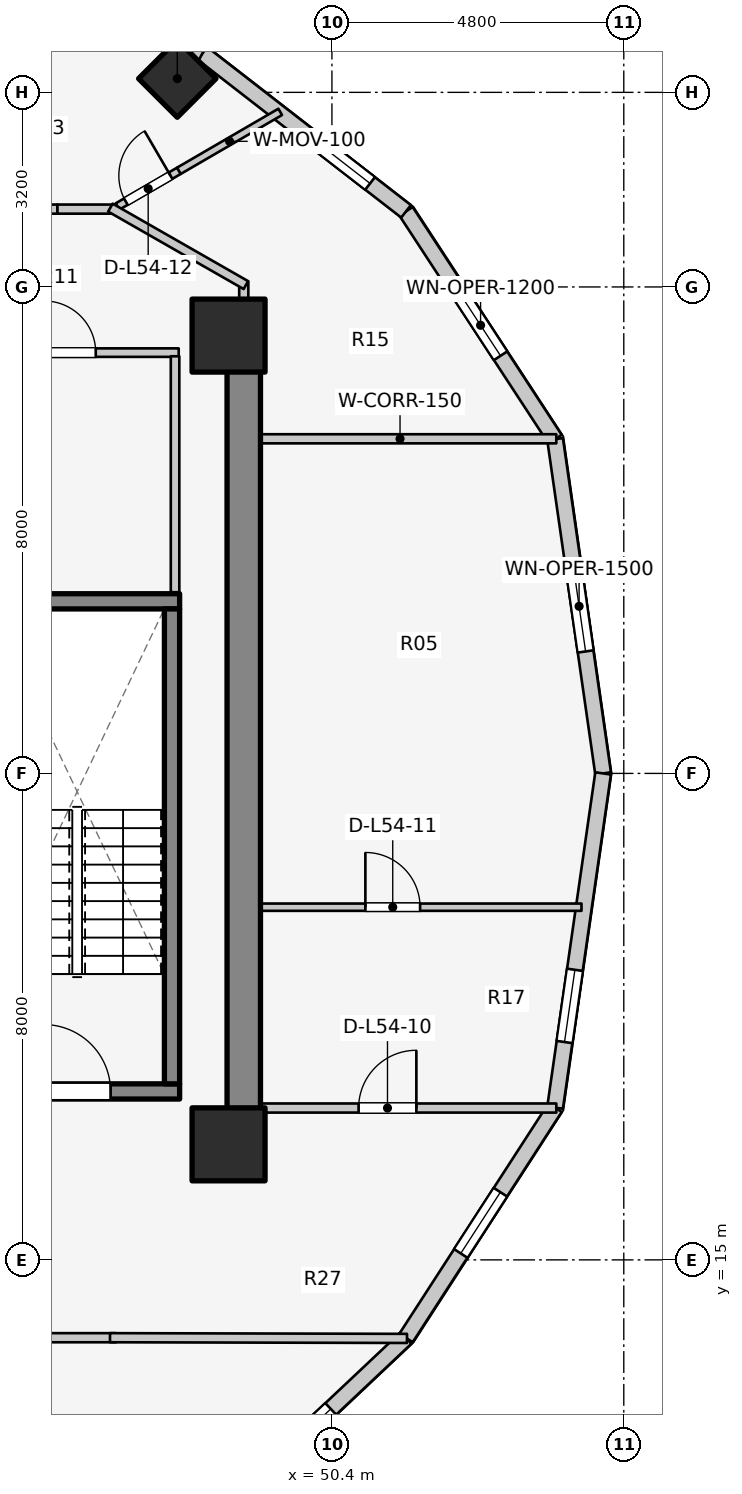
"""IFC4 building model, lengths in metres.
Left out: names, types, materials, properties, quantities, classifications, styles, units other than length and angle.
Written with IfcOpenShell. Run it as: python <this file> out.ifc"""

import sys

from ifc_helpers import new_model, si_unit, direction, frame, frame_2d, origin, origin_2d, place, context, subcontext, project, spatial, rectangle, extrude, element, fill, save


model = new_model("IFC4")
c1 = context("Model", 3, precision=1e-05, world=origin(), true_north=direction((0.0, 1.0)))
c2 = subcontext(c1, "Body", "Model", "MODEL_VIEW")
j1 = project(units=[si_unit("LENGTHUNIT", "METRE"), si_unit("PLANEANGLEUNIT", "RADIAN")], contexts=[c1])
p1 = place(None, origin())
s1 = spatial("IfcSite", under=j1, at=p1, CompositionType="ELEMENT")
p2 = place(p1, origin())
s2 = spatial("IfcBuilding", under=s1, at=p2, CompositionType="ELEMENT")
p3 = place(p2, frame((0.0, 0.0, 177.7)))
s3 = spatial("IfcBuildingStorey", under=s2, at=p3, CompositionType="ELEMENT", Elevation=177.7)
p4 = place(p3, frame((48.95, 17.05, 0.0), z_axis=(0.0, 0.0, 1.0), x_axis=(0.0, 1.0, 0.0)))
e1 = element("IfcWall", 1, at=p4, inside=s3, PredefinedType="SHEAR", context=c2, shape_type="SweptSolid", body=[
    extrude(rectangle(XDim=12.8, YDim=0.55, at=frame_2d((6.4, 0.0))), origin(), (0.0, 0.0, 1.0), 3.1),
])
p5 = place(p3, frame((44.525, 17.77, 0.0), z_axis=(0.0, 0.0, 1.0), x_axis=(1.0, 0.0, 0.0)))
e2 = element("IfcWall", 2, at=p5, inside=s3, PredefinedType="SOLIDWALL", context=c2, shape_type="SweptSolid", body=[
    extrude(rectangle(XDim=3.37, YDim=0.25, at=frame_2d((1.685, 0.0))), origin(), (0.0, 0.0, 1.0), 3.1),
])
p6 = place(p5, frame((1.135, 0.0, 0.0)))
e3 = element("IfcOpeningElement", 3, at=p6, cuts=e2, PredefinedType="OPENING", context=c2, shape_type="SweptSolid", body=[
    extrude(rectangle(XDim=1.1, YDim=2.1, at=frame_2d((0.55, 1.05))), frame((0.0, 0.135, 0.0), z_axis=(0.0, -1.0, 0.0), x_axis=(1.0, 0.0, 0.0)), (0.0, 0.0, 1.0), 0.27),
])
p7 = place(p3, frame((44.525, 25.83, 0.0), z_axis=(0.0, 0.0, 1.0), x_axis=(1.0, 0.0, 0.0)))
e4 = element("IfcWall", 4, at=p7, inside=s3, PredefinedType="SOLIDWALL", context=c2, shape_type="SweptSolid", body=[
    extrude(rectangle(XDim=3.37, YDim=0.25, at=frame_2d((1.685, 0.0))), origin(), (0.0, 0.0, 1.0), 3.1),
])
p8 = place(p3, frame((47.77, 17.895, 0.0), z_axis=(0.0, 0.0, 1.0), x_axis=(0.0, 1.0, 0.0)))
e5 = element("IfcWall", 5, at=p8, inside=s3, PredefinedType="SOLIDWALL", context=c2, shape_type="SweptSolid", body=[
    extrude(rectangle(XDim=7.81, YDim=0.25, at=frame_2d((3.905, 0.0))), origin(), (0.0, 0.0, 1.0), 3.1),
])
for number, where, z_axis, x_axis in (
    (6, (48.7, 16.9, 0.0), (0.0, 0.0, 1.0), (1.0, 0.0, 0.0)),
    (7, (48.7, 30.2, 0.0), (0.0, 0.0, 1.0), (1.0, 0.0, 0.0)),
):
    element("IfcColumn", number, at=place(p3, frame(where, z_axis=z_axis, x_axis=x_axis)), inside=s3, PredefinedType="COLUMN", context=c2, shape_type="SweptSolid", body=[
        extrude(rectangle(XDim=1.2, YDim=1.2, at=origin_2d()), origin(), (0.0, 0.0, 1.0), 3.1),
    ])
p9 = place(p3, frame((47.857, 34.427, 0.0), z_axis=(0.0, 0.0, 1.0), x_axis=(0.707106781187, 0.707106781187, 0.0)))
e8 = element("IfcColumn", 8, at=p9, inside=s3, PredefinedType="COLUMN", context=c2, shape_type="SweptSolid", body=[
    extrude(rectangle(XDim=0.9, YDim=0.9, at=origin_2d()), origin(), (0.0, 0.0, 1.0), 3.1),
])
p10 = place(p3, frame((54.86, 23.0, 0.0), z_axis=(0.0, 0.0, 1.0), x_axis=(-0.142227632286, 0.989833976288, 0.0)))
e9 = element("IfcWall", 9, at=p10, inside=s3, PredefinedType="STANDARD", context=c2, shape_type="SweptSolid", body=[
    extrude(rectangle(XDim=5.553, YDim=0.26, at=frame_2d((2.776, 0.0))), origin(), (0.0, 0.0, 1.0), 2.57),
])
p11 = place(p10, frame((2.027, 0.0, 0.75)))
e10 = element("IfcOpeningElement", 10, at=p11, cuts=e9, PredefinedType="OPENING", context=c2, shape_type="SweptSolid", body=[
    extrude(rectangle(XDim=1.5, YDim=1.6, at=frame_2d((0.75, 0.8))), frame((0.0, 0.14, 0.0), z_axis=(0.0, -1.0, 0.0), x_axis=(1.0, 0.0, 0.0)), (0.0, 0.0, 1.0), 0.28),
])
p12 = place(p3, frame((54.07, 28.497, 0.0), z_axis=(0.0, 0.0, 1.0), x_axis=(-0.547456494366, 0.836834145322, 0.0)))
e11 = element("IfcWall", 11, at=p12, inside=s3, PredefinedType="STANDARD", context=c2, shape_type="SweptSolid", body=[
    extrude(rectangle(XDim=4.477, YDim=0.26, at=frame_2d((2.239, 0.0))), origin(), (0.0, 0.0, 1.0), 1.22),
])
p13 = place(p12, frame((1.639, 0.0, 0.15)))
e12 = element("IfcOpeningElement", 12, at=p13, cuts=e11, PredefinedType="OPENING", context=c2, shape_type="SweptSolid", body=[
    extrude(rectangle(XDim=1.2, YDim=0.9, at=frame_2d((0.6, 0.45))), frame((0.0, 0.14, 0.0), z_axis=(0.0, -1.0, 0.0), x_axis=(1.0, 0.0, 0.0)), (0.0, 0.0, 1.0), 0.28),
])
p14 = place(p3, frame((51.619, 32.243, 0.0), z_axis=(0.0, 0.0, 1.0), x_axis=(-0.790185650662, 0.612867552973, 0.0)))
e13 = element("IfcWall", 13, at=p14, inside=s3, PredefinedType="STANDARD", context=c2, shape_type="SweptSolid", body=[
    extrude(rectangle(XDim=4.239, YDim=0.26, at=frame_2d((2.12, 0.0))), origin(), (0.0, 0.0, 1.0), 1.22),
])
p15 = place(p14, frame((0.749, 0.0, 0.15)))
e14 = element("IfcOpeningElement", 14, at=p15, cuts=e13, PredefinedType="OPENING", context=c2, shape_type="SweptSolid", body=[
    extrude(rectangle(XDim=1.2, YDim=0.9, at=frame_2d((0.6, 0.45))), frame((0.0, 0.14, 0.0), z_axis=(0.0, -1.0, 0.0), x_axis=(1.0, 0.0, 0.0)), (0.0, 0.0, 1.0), 0.28),
])
p16 = place(p3, frame((48.269, 34.842, 0.0), z_axis=(0.0, 0.0, 1.0), x_axis=(-0.885660265226, 0.464333818065, 0.0)))
e15 = element("IfcWall", 15, at=p16, inside=s3, PredefinedType="STANDARD", context=c2, shape_type="SweptSolid", body=[
    extrude(rectangle(XDim=4.354, YDim=0.26, at=frame_2d((2.177, 0.0))), origin(), (0.0, 0.0, 1.0), 1.22),
])
p17 = place(p3, frame((48.269, 10.559, 0.0), z_axis=(0.0, 0.0, 1.0), x_axis=(0.727667301037, 0.68593024354, 0.0)))
e16 = element("IfcWall", 16, at=p17, inside=s3, PredefinedType="STANDARD", context=c2, shape_type="SweptSolid", body=[
    extrude(rectangle(XDim=4.604, YDim=0.26, at=frame_2d((2.302, 0.0))), origin(), (0.0, 0.0, 1.0), 1.22),
])
p18 = place(p17, frame((1.702, 0.0, 0.15)))
e17 = element("IfcOpeningElement", 17, at=p18, cuts=e16, PredefinedType="OPENING", context=c2, shape_type="SweptSolid", body=[
    extrude(rectangle(XDim=1.2, YDim=0.9, at=frame_2d((0.6, 0.45))), frame((0.0, 0.14, 0.0), z_axis=(0.0, -1.0, 0.0), x_axis=(1.0, 0.0, 0.0)), (0.0, 0.0, 1.0), 0.28),
])
p19 = place(p3, frame((51.619, 13.716, 0.0), z_axis=(0.0, 0.0, 1.0), x_axis=(0.543358984534, 0.839500454989, 0.0)))
e18 = element("IfcWall", 18, at=p19, inside=s3, PredefinedType="STANDARD", context=c2, shape_type="SweptSolid", body=[
    extrude(rectangle(XDim=4.511, YDim=0.26, at=frame_2d((2.256, 0.0))), origin(), (0.0, 0.0, 1.0), 1.22),
])
p20 = place(p19, frame((1.656, 0.0, 0.15)))
e19 = element("IfcOpeningElement", 19, at=p20, cuts=e18, PredefinedType="OPENING", context=c2, shape_type="SweptSolid", body=[
    extrude(rectangle(XDim=1.2, YDim=0.9, at=frame_2d((0.6, 0.45))), frame((0.0, 0.14, 0.0), z_axis=(0.0, -1.0, 0.0), x_axis=(1.0, 0.0, 0.0)), (0.0, 0.0, 1.0), 0.28),
])
p21 = place(p3, frame((54.07, 17.503, 0.0), z_axis=(0.0, 0.0, 1.0), x_axis=(0.142227632286, 0.989833976288, 0.0)))
e20 = element("IfcWall", 20, at=p21, inside=s3, PredefinedType="STANDARD", context=c2, shape_type="SweptSolid", body=[
    extrude(rectangle(XDim=5.553, YDim=0.26, at=frame_2d((2.776, 0.0))), origin(), (0.0, 0.0, 1.0), 2.57),
])
p22 = place(p21, frame((1.09, 0.0, 0.75)))
e21 = element("IfcOpeningElement", 21, at=p22, cuts=e20, PredefinedType="OPENING", context=c2, shape_type="SweptSolid", body=[
    extrude(rectangle(XDim=1.2, YDim=1.5, at=frame_2d((0.6, 0.75))), frame((0.0, 0.14, 0.0), z_axis=(0.0, -1.0, 0.0), x_axis=(1.0, 0.0, 0.0)), (0.0, 0.0, 1.0), 0.28),
])
p23 = place(p3, frame((44.98, 29.92, 0.0), z_axis=(0.0, 0.0, 1.0), x_axis=(1.0, 0.0, 0.0)))
e22 = element("IfcWall", 22, at=p23, inside=s3, PredefinedType="PLUMBINGWALL", context=c2, shape_type="SweptSolid", body=[
    extrude(rectangle(XDim=2.9, YDim=0.14, at=frame_2d((1.45, 0.0))), origin(), (0.0, 0.0, 1.0), 2.575),
])
p24 = place(p23, frame((0.686, 0.0, 0.0)))
e23 = element("IfcOpeningElement", 23, at=p24, cuts=e22, PredefinedType="OPENING", context=c2, shape_type="SweptSolid", body=[
    extrude(rectangle(XDim=0.85, YDim=2.05, at=frame_2d((0.425, 1.025))), frame((0.0, 0.08, 0.0), z_axis=(0.0, -1.0, 0.0), x_axis=(1.0, 0.0, 0.0)), (0.0, 0.0, 1.0), 0.16),
])
p25 = place(p3, frame((47.82, 25.98, 0.0), z_axis=(0.0, 0.0, 1.0), x_axis=(0.0, 1.0, 0.0)))
e24 = element("IfcWall", 24, at=p25, inside=s3, PredefinedType="PLUMBINGWALL", context=c2, shape_type="SweptSolid", body=[
    extrude(rectangle(XDim=3.88, YDim=0.14, at=frame_2d((1.94, 0.0))), origin(), (0.0, 0.0, 1.0), 2.575),
])
p26 = place(p3, frame((48.95, 17.497, 0.0), z_axis=(0.0, 0.0, 1.0), x_axis=(1.0, 0.0, 0.0)))
e25 = element("IfcWall", 25, at=p26, inside=s3, PredefinedType="PARTITIONING", context=c2, shape_type="SweptSolid", body=[
    extrude(rectangle(XDim=5.14, YDim=0.15, at=frame_2d((2.57, 0.0))), origin(), (0.0, 0.0, 1.0), 2.575),
])
p27 = place(p26, frame((1.889, 0.0, 0.0)))
e26 = element("IfcOpeningElement", 26, at=p27, cuts=e25, PredefinedType="OPENING", context=c2, shape_type="SweptSolid", body=[
    extrude(rectangle(XDim=0.95, YDim=2.1, at=frame_2d((0.475, 1.05))), frame((0.0, 0.085, 0.0), z_axis=(0.0, -1.0, 0.0), x_axis=(1.0, 0.0, 0.0)), (0.0, 0.0, 1.0), 0.17),
])
p28 = place(p3, frame((48.95, 28.503, 0.0), z_axis=(0.0, 0.0, 1.0), x_axis=(1.0, 0.0, 0.0)))
e27 = element("IfcWall", 27, at=p28, inside=s3, PredefinedType="PARTITIONING", context=c2, shape_type="SweptSolid", body=[
    extrude(rectangle(XDim=5.14, YDim=0.15, at=frame_2d((2.57, 0.0))), origin(), (0.0, 0.0, 1.0), 2.575),
])
p29 = place(p3, frame((48.95, 20.8, 0.0), z_axis=(0.0, 0.0, 1.0), x_axis=(1.0, 0.0, 0.0)))
e28 = element("IfcWall", 28, at=p29, inside=s3, PredefinedType="MOVABLE", context=c2, shape_type="SweptSolid", body=[
    extrude(rectangle(XDim=5.554, YDim=0.12, at=frame_2d((2.777, 0.0))), origin(), (0.0, 0.0, 1.0), 2.575),
])
p30 = place(p29, frame((2.0, 0.0, 0.0)))
e29 = element("IfcOpeningElement", 29, at=p30, cuts=e28, PredefinedType="OPENING", context=c2, shape_type="SweptSolid", body=[
    extrude(rectangle(XDim=0.9, YDim=2.1, at=frame_2d((0.45, 1.05))), frame((0.0, 0.07, 0.0), z_axis=(0.0, -1.0, 0.0), x_axis=(1.0, 0.0, 0.0)), (0.0, 0.0, 1.0), 0.14),
])
p31 = place(p3, frame((48.95, 29.8, 0.0), z_axis=(0.0, 0.0, 1.0), x_axis=(0.0, 1.0, 0.0)))
e30 = element("IfcWall", 30, at=p31, inside=s3, PredefinedType="PARTITIONING", context=c2, shape_type="SweptSolid", body=[
    extrude(rectangle(XDim=1.29, YDim=0.15, at=frame_2d((0.645, 0.0))), origin(), (0.0, 0.0, 1.0), 1.22),
])
p32 = place(p3, frame((46.872, 32.322, 0.0), z_axis=(0.0, 0.0, 1.0), x_axis=(0.864338442283, 0.502910585683, 0.0)))
e31 = element("IfcWall", 31, at=p32, inside=s3, PredefinedType="MOVABLE", context=c2, shape_type="SweptSolid", body=[
    extrude(rectangle(XDim=1.17, YDim=0.12, at=frame_2d((0.585, 0.0))), origin(), (0.0, 0.0, 1.0), 2.11),
])
p33 = place(p32, frame((0.16, 0.0, 0.0)))
e32 = element("IfcOpeningElement", 32, at=p33, cuts=e31, PredefinedType="OPENING", context=c2, shape_type="SweptSolid", body=[
    extrude(rectangle(XDim=0.85, YDim=2.05, at=frame_2d((0.425, 1.025))), frame((0.0, 0.07, 0.0), z_axis=(0.0, -1.0, 0.0), x_axis=(1.0, 0.0, 0.0)), (0.0, 0.0, 1.0), 0.14),
])
p34 = place(p3, frame((47.884, 32.91, 0.0), z_axis=(0.0, 0.0, 1.0), x_axis=(0.864444446654, 0.50272835473, 0.0)))
e33 = element("IfcWall", 33, at=p34, inside=s3, PredefinedType="MOVABLE", context=c2, shape_type="SweptSolid", body=[
    extrude(rectangle(XDim=1.927, YDim=0.12, at=frame_2d((0.963, 0.0))), origin(), (0.0, 0.0, 1.0), 1.22),
])
p35 = place(p3, frame((44.666, 32.28, 0.0), z_axis=(0.0, 0.0, 1.0), x_axis=(1.0, 0.0, 0.0)))
e34 = element("IfcWall", 34, at=p35, inside=s3, PredefinedType="PARTITIONING", context=c2, shape_type="SweptSolid", body=[
    extrude(rectangle(XDim=1.22, YDim=0.15, at=frame_2d((0.61, 0.0))), origin(), (0.0, 0.0, 1.0), 2.16),
])
p36 = place(p35, frame((0.16, 0.0, 0.0)))
e35 = element("IfcOpeningElement", 35, at=p36, cuts=e34, PredefinedType="OPENING", context=c2, shape_type="SweptSolid", body=[
    extrude(rectangle(XDim=0.9, YDim=2.1, at=frame_2d((0.45, 1.05))), frame((0.0, 0.085, 0.0), z_axis=(0.0, -1.0, 0.0), x_axis=(1.0, 0.0, 0.0)), (0.0, 0.0, 1.0), 0.17),
])
p37 = place(p3, frame((45.886, 32.28, 0.0), z_axis=(0.0, 0.0, 1.0), x_axis=(1.0, 0.0, 0.0)))
e36 = element("IfcWall", 36, at=p37, inside=s3, PredefinedType="PARTITIONING", context=c2, shape_type="SweptSolid", body=[
    extrude(rectangle(XDim=0.964, YDim=0.15, at=frame_2d((0.482, 0.0))), origin(), (0.0, 0.0, 1.0), 2.575),
])
p38 = place(p3, frame((46.757, 32.305, 0.0), z_axis=(0.0, 0.0, 1.0), x_axis=(0.867991349648, -0.496579315857, 0.0)))
e37 = element("IfcWall", 37, at=p38, inside=s3, PredefinedType="PARTITIONING", context=c2, shape_type="SweptSolid", body=[
    extrude(rectangle(XDim=2.567, YDim=0.15, at=frame_2d((1.283, 0.0))), origin(), (0.0, 0.0, 1.0), 1.22),
])
p39 = place(p3, frame((45.61, 13.72, 0.0), z_axis=(0.0, 0.0, 1.0), x_axis=(1.0, 0.0, 0.0)))
e38 = element("IfcWall", 38, at=p39, inside=s3, PredefinedType="PARTITIONING", context=c2, shape_type="SweptSolid", body=[
    extrude(rectangle(XDim=1.24, YDim=0.15, at=frame_2d((0.62, 0.0))), origin(), (0.0, 0.0, 1.0), 2.575),
])
p40 = place(p3, frame((46.75, 13.72, 0.0), z_axis=(0.0, 0.0, 1.0), x_axis=(0.999997122315, -0.00239903348, 0.0)))
e39 = element("IfcWall", 39, at=p40, inside=s3, PredefinedType="PARTITIONING", context=c2, shape_type="SweptSolid", body=[
    extrude(rectangle(XDim=4.885, YDim=0.15, at=frame_2d((2.442, 0.0))), origin(), (0.0, 0.0, 1.0), 1.22),
])
p41 = place(p11, origin())
e40 = element("IfcWindow", 40, at=p41, inside=s3, PartitioningType="SINGLE_PANEL", PredefinedType="WINDOW", context=c2, shape_type="SweptSolid", body=[
    extrude(rectangle(XDim=1.5, YDim=1.6, at=frame_2d((0.75, 0.8))), frame((0.0, 0.03, 0.0), z_axis=(0.0, -1.0, 0.0), x_axis=(1.0, 0.0, 0.0)), (0.0, 0.0, 1.0), 0.06),
])
fill(e10, e40)
p42 = place(p13, origin())
e41 = element("IfcWindow", 41, at=p42, inside=s3, PartitioningType="SINGLE_PANEL", PredefinedType="WINDOW", context=c2, shape_type="SweptSolid", body=[
    extrude(rectangle(XDim=1.2, YDim=0.9, at=frame_2d((0.6, 0.45))), frame((0.0, 0.03, 0.0), z_axis=(0.0, -1.0, 0.0), x_axis=(1.0, 0.0, 0.0)), (0.0, 0.0, 1.0), 0.06),
])
fill(e12, e41)
p43 = place(p15, origin())
e42 = element("IfcWindow", 42, at=p43, inside=s3, PartitioningType="SINGLE_PANEL", PredefinedType="WINDOW", context=c2, shape_type="SweptSolid", body=[
    extrude(rectangle(XDim=1.2, YDim=0.9, at=frame_2d((0.6, 0.45))), frame((0.0, 0.03, 0.0), z_axis=(0.0, -1.0, 0.0), x_axis=(1.0, 0.0, 0.0)), (0.0, 0.0, 1.0), 0.06),
])
fill(e14, e42)
p44 = place(p18, origin())
e43 = element("IfcWindow", 43, at=p44, inside=s3, PartitioningType="SINGLE_PANEL", PredefinedType="WINDOW", context=c2, shape_type="SweptSolid", body=[
    extrude(rectangle(XDim=1.2, YDim=0.9, at=frame_2d((0.6, 0.45))), frame((0.0, 0.03, 0.0), z_axis=(0.0, -1.0, 0.0), x_axis=(1.0, 0.0, 0.0)), (0.0, 0.0, 1.0), 0.06),
])
fill(e17, e43)
p45 = place(p20, origin())
e44 = element("IfcWindow", 44, at=p45, inside=s3, PartitioningType="SINGLE_PANEL", PredefinedType="WINDOW", context=c2, shape_type="SweptSolid", body=[
    extrude(rectangle(XDim=1.2, YDim=0.9, at=frame_2d((0.6, 0.45))), frame((0.0, 0.03, 0.0), z_axis=(0.0, -1.0, 0.0), x_axis=(1.0, 0.0, 0.0)), (0.0, 0.0, 1.0), 0.06),
])
fill(e19, e44)
p46 = place(p22, origin())
e45 = element("IfcWindow", 45, at=p46, inside=s3, PartitioningType="SINGLE_PANEL", PredefinedType="WINDOW", context=c2, shape_type="SweptSolid", body=[
    extrude(rectangle(XDim=1.2, YDim=1.5, at=frame_2d((0.6, 0.75))), frame((0.0, 0.03, 0.0), z_axis=(0.0, -1.0, 0.0), x_axis=(1.0, 0.0, 0.0)), (0.0, 0.0, 1.0), 0.06),
])
fill(e21, e45)
p47 = place(p6, origin())
e46 = element("IfcDoor", 46, at=p47, inside=s3, OperationType="SINGLE_SWING_LEFT", PredefinedType="DOOR", context=c2, shape_type="SweptSolid", body=[
    extrude(rectangle(XDim=1.1, YDim=2.1, at=frame_2d((0.55, 1.05))), frame((0.0, 0.025, 0.0), z_axis=(0.0, -1.0, 0.0), x_axis=(1.0, 0.0, 0.0)), (0.0, 0.0, 1.0), 0.05),
])
fill(e3, e46)
p48 = place(p24, origin())
e47 = element("IfcDoor", 47, at=p48, inside=s3, OperationType="SINGLE_SWING_LEFT", PredefinedType="DOOR", context=c2, shape_type="SweptSolid", body=[
    extrude(rectangle(XDim=0.85, YDim=2.05, at=frame_2d((0.425, 1.025))), frame((0.0, 0.025, 0.0), z_axis=(0.0, -1.0, 0.0), x_axis=(1.0, 0.0, 0.0)), (0.0, 0.0, 1.0), 0.05),
])
fill(e23, e47)
p49 = place(p27, origin())
e48 = element("IfcDoor", 48, at=p49, inside=s3, OperationType="SINGLE_SWING_RIGHT", PredefinedType="DOOR", context=c2, shape_type="SweptSolid", body=[
    extrude(rectangle(XDim=0.95, YDim=2.1, at=frame_2d((0.475, 1.05))), frame((0.0, 0.025, 0.0), z_axis=(0.0, -1.0, 0.0), x_axis=(1.0, 0.0, 0.0)), (0.0, 0.0, 1.0), 0.05),
])
fill(e26, e48)
p50 = place(p30, origin())
e49 = element("IfcDoor", 49, at=p50, inside=s3, OperationType="SINGLE_SWING_LEFT", PredefinedType="DOOR", context=c2, shape_type="SweptSolid", body=[
    extrude(rectangle(XDim=0.9, YDim=2.1, at=frame_2d((0.45, 1.05))), frame((0.0, 0.025, 0.0), z_axis=(0.0, -1.0, 0.0), x_axis=(1.0, 0.0, 0.0)), (0.0, 0.0, 1.0), 0.05),
])
fill(e29, e49)
p51 = place(p33, origin())
e50 = element("IfcDoor", 50, at=p51, inside=s3, OperationType="SINGLE_SWING_RIGHT", PredefinedType="DOOR", context=c2, shape_type="SweptSolid", body=[
    extrude(rectangle(XDim=0.85, YDim=2.05, at=frame_2d((0.425, 1.025))), frame((0.0, 0.025, 0.0), z_axis=(0.0, -1.0, 0.0), x_axis=(1.0, 0.0, 0.0)), (0.0, 0.0, 1.0), 0.05),
])
fill(e32, e50)
save(model, sys.argv[1])
